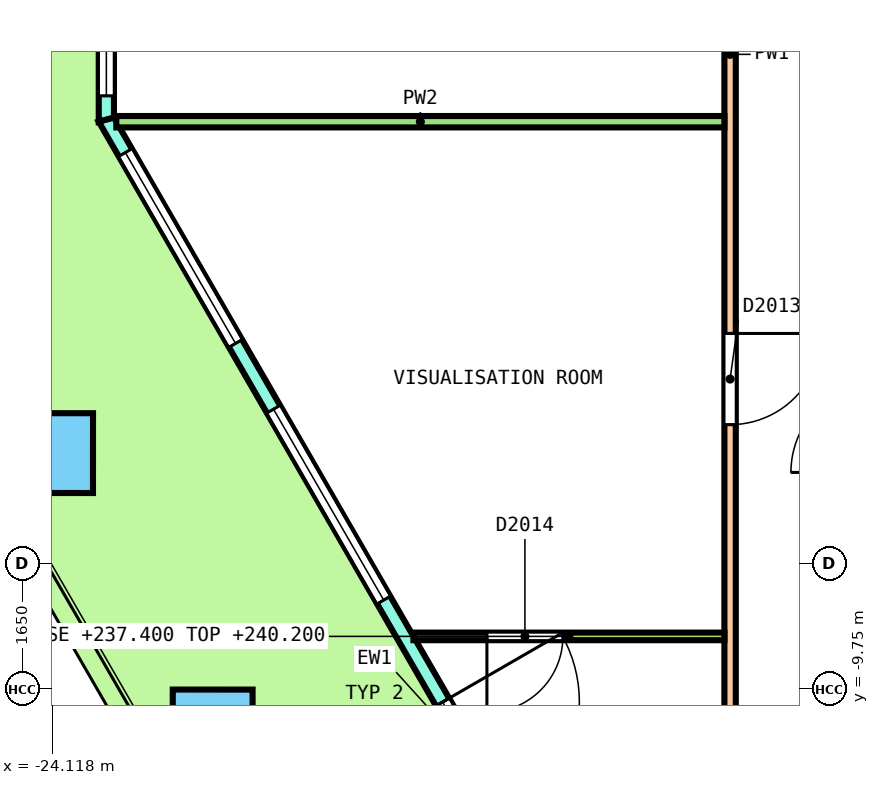
"""IFC4 building model, lengths in metres.
Left out: names, types, materials, properties, quantities, classifications, styles, units other than length and angle.
Written with IfcOpenShell. Run it as: python <this file> out.ifc"""

import sys

from ifc_helpers import new_model, si_unit, direction, frame, frame_2d, origin, origin_2d, place, context, subcontext, project, spatial, polyline, rectangle, outline, extrude, element, fill, save


model = new_model("IFC4")
c1 = context("Model", 3, precision=1e-05, world=origin(), true_north=direction((0.0, 1.0)))
c2 = subcontext(c1, "Body", "Model", "MODEL_VIEW")
j1 = project(units=[si_unit("LENGTHUNIT", "METRE"), si_unit("PLANEANGLEUNIT", "RADIAN")], contexts=[c1])
p1 = place(None, origin())
s1 = spatial("IfcSite", under=j1, at=p1, CompositionType="ELEMENT")
p2 = place(p1, origin())
s2 = spatial("IfcBuilding", under=s1, at=p2, CompositionType="ELEMENT")
p3 = place(p2, frame((0.0, 0.0, 237.4)))
s3 = spatial("IfcBuildingStorey", under=s2, at=p3, CompositionType="ELEMENT", Elevation=237.4)
p4 = place(p3, frame((-24.107, -6.646, 0.0), z_axis=(-0.010899694483, 0.018857140148, 0.999762774325), x_axis=(0.499728940012, -0.865907957958, 0.021780607409)))
e1 = element("IfcColumn", 1, at=p4, inside=s3, PredefinedType="COLUMN", context=c2, shape_type="SweptSolid", body=[
    extrude(rectangle(XDim=1.05, YDim=1.05, at=origin_2d()), origin(), (0.0, 0.0, 1.0), 3.651),
])
p5 = place(p3, frame((-22.008, -10.282, 0.0), z_axis=(-0.003611703602, 0.006287039604, 0.99997371402), x_axis=(0.497890396548, -0.867209652713, 0.007250604559)))
e2 = element("IfcColumn", 2, at=p5, inside=s3, PredefinedType="COLUMN", context=c2, shape_type="SweptSolid", body=[
    extrude(rectangle(XDim=1.05, YDim=1.05, at=origin_2d()), origin(), (0.0, 0.0, 1.0), 3.65),
])
p6 = place(p3, frame((-23.406, 3.894, 0.0), z_axis=(0.0, 0.0, 1.0), x_axis=(0.0, -1.0, 0.0)))
e3 = element("IfcWall", 3, at=p6, inside=s3, PredefinedType="SOLIDWALL", context=c2, shape_type="SweptSolid", body=[
    extrude(outline(polyline([(-0.027, -0.1), (1.008, -0.1), (2.042, -0.1), (3.077, -0.1), (4.111, -0.1), (5.146, -0.1), (6.18, -0.1), (6.126, 0.1), (5.11, 0.1), (4.093, 0.1), (3.077, 0.1), (2.06, 0.1), (1.043, 0.1), (0.027, 0.1), (-0.027, -0.1)])), origin(), (0.0, 0.0, 1.0), 3.7),
])
p7 = place(p6, frame((0.313, 0.0, 0.1)))
e4 = element("IfcOpeningElement", 4, at=p7, cuts=e3, PredefinedType="OPENING", context=c2, shape_type="SweptSolid", body=[
    extrude(rectangle(XDim=2.45, YDim=2.65, at=frame_2d((1.225, 1.325))), frame((0.0, 0.11, 0.0), z_axis=(0.0, -1.0, 0.0), x_axis=(1.0, 0.0, 0.0)), (0.0, 0.0, 1.0), 0.22),
])
p8 = place(p6, frame((3.39, 0.0, 0.1)))
e5 = element("IfcOpeningElement", 5, at=p8, cuts=e3, PredefinedType="OPENING", context=c2, shape_type="SweptSolid", body=[
    extrude(rectangle(XDim=2.45, YDim=2.65, at=frame_2d((1.225, 1.325))), frame((0.0, 0.11, 0.0), z_axis=(0.0, -1.0, 0.0), x_axis=(1.0, 0.0, 0.0)), (0.0, 0.0, 1.0), 0.22),
])
p9 = place(p3, frame((-23.406, -2.26, 0.0), z_axis=(0.0, 0.0, 1.0), x_axis=(0.500001086243, -0.866024776641, 0.0)))
e6 = element("IfcWall", 6, at=p9, inside=s3, PredefinedType="SOLIDWALL", context=c2, shape_type="SweptSolid", body=[
    extrude(outline(polyline([(-0.027, -0.1), (1.002, -0.1), (2.031, -0.1), (3.059, -0.1), (4.088, -0.1), (5.117, -0.1), (6.146, -0.1), (7.175, -0.1), (8.203, -0.1), (9.232, -0.1), (10.261, -0.1), (11.29, -0.1), (12.318, -0.1), (13.347, -0.1), (14.376, -0.1), (15.405, -0.1), (16.433, -0.1), (17.462, -0.1), (18.491, -0.1), (19.52, -0.1), (19.466, 0.1), (18.443, 0.1), (17.42, 0.1), (16.396, 0.1), (15.373, 0.1), (14.35, 0.1), (13.327, 0.1), (12.304, 0.1), (11.281, 0.1), (10.258, 0.1), (9.235, 0.1), (8.212, 0.1), (7.188, 0.1), (6.166, 0.1), (5.142, 0.1), (4.119, 0.1), (3.096, 0.1), (2.073, 0.1), (1.05, 0.1), (0.027, 0.1), (-0.027, -0.1)])), origin(), (0.0, 0.0, 1.0), 3.7),
])
p10 = place(p9, frame((0.499, 0.0, 0.1)))
e7 = element("IfcOpeningElement", 7, at=p10, cuts=e6, PredefinedType="OPENING", context=c2, shape_type="SweptSolid", body=[
    extrude(rectangle(XDim=2.9, YDim=2.65, at=frame_2d((1.45, 1.325))), frame((0.0, 0.11, 0.0), z_axis=(0.0, -1.0, 0.0), x_axis=(1.0, 0.0, 0.0)), (0.0, 0.0, 1.0), 0.22),
])
p11 = place(p9, frame((4.398, 0.0, 0.1)))
e8 = element("IfcOpeningElement", 8, at=p11, cuts=e6, PredefinedType="OPENING", context=c2, shape_type="SweptSolid", body=[
    extrude(rectangle(XDim=2.9, YDim=2.65, at=frame_2d((1.45, 1.325))), frame((0.0, 0.11, 0.0), z_axis=(0.0, -1.0, 0.0), x_axis=(1.0, 0.0, 0.0)), (0.0, 0.0, 1.0), 0.22),
])
p12 = place(p9, frame((8.846, 0.0, 0.0)))
e9 = element("IfcOpeningElement", 9, at=p12, cuts=e6, PredefinedType="OPENING", context=c2, shape_type="SweptSolid", body=[
    extrude(rectangle(XDim=1.8, YDim=2.4, at=frame_2d((0.9, 1.2))), frame((0.0, 0.11, 0.0), z_axis=(0.0, -1.0, 0.0), x_axis=(1.0, 0.0, 0.0)), (0.0, 0.0, 1.0), 0.22),
])
p13 = place(p9, frame((8.846, 0.0, 2.55)))
e10 = element("IfcOpeningElement", 10, at=p13, cuts=e6, PredefinedType="OPENING", context=c2, shape_type="SweptSolid", body=[
    extrude(rectangle(XDim=1.8, YDim=0.2, at=frame_2d((0.9, 0.1))), frame((0.0, 0.11, 0.0), z_axis=(0.0, -1.0, 0.0), x_axis=(1.0, 0.0, 0.0)), (0.0, 0.0, 1.0), 0.22),
])
p14 = place(p9, frame((12.195, 0.0, 0.1)))
e11 = element("IfcOpeningElement", 11, at=p14, cuts=e6, PredefinedType="OPENING", context=c2, shape_type="SweptSolid", body=[
    extrude(rectangle(XDim=2.9, YDim=2.65, at=frame_2d((1.45, 1.325))), frame((0.0, 0.11, 0.0), z_axis=(0.0, -1.0, 0.0), x_axis=(1.0, 0.0, 0.0)), (0.0, 0.0, 1.0), 0.22),
])
p15 = place(p9, frame((16.094, 0.0, 0.1)))
e12 = element("IfcOpeningElement", 12, at=p15, cuts=e6, PredefinedType="OPENING", context=c2, shape_type="SweptSolid", body=[
    extrude(rectangle(XDim=2.9, YDim=2.65, at=frame_2d((1.45, 1.325))), frame((0.0, 0.11, 0.0), z_axis=(0.0, -1.0, 0.0), x_axis=(1.0, 0.0, 0.0)), (0.0, 0.0, 1.0), 0.22),
])
p16 = place(p3, frame((-15.2, -10.025, 0.0), z_axis=(0.0, 0.0, 1.0), x_axis=(0.0, 1.0, 0.0)))
e13 = element("IfcWall", 13, at=p16, inside=s3, PredefinedType="PARTITIONING", context=c2, shape_type="SweptSolid", body=[
    extrude(rectangle(XDim=17.25, YDim=0.15, at=frame_2d((8.625, 0.0))), origin(), (0.0, 0.0, 1.0), 2.8),
])
p17 = place(p16, frame((10.727, 0.0, 0.0)))
e14 = element("IfcOpeningElement", 14, at=p17, cuts=e13, PredefinedType="OPENING", context=c2, shape_type="SweptSolid", body=[
    extrude(rectangle(XDim=1.2, YDim=2.1, at=frame_2d((0.6, 1.05))), frame((0.0, 0.085, 0.0), z_axis=(0.0, -1.0, 0.0), x_axis=(1.0, 0.0, 0.0)), (0.0, 0.0, 1.0), 0.17),
])
p18 = place(p16, frame((3.753, 0.0, 0.0)))
e15 = element("IfcOpeningElement", 15, at=p18, cuts=e13, PredefinedType="OPENING", context=c2, shape_type="SweptSolid", body=[
    extrude(rectangle(XDim=1.2, YDim=2.1, at=frame_2d((0.6, 1.05))), frame((0.0, 0.085, 0.0), z_axis=(0.0, -1.0, 0.0), x_axis=(1.0, 0.0, 0.0)), (0.0, 0.0, 1.0), 0.17),
])
p19 = place(p3, frame((-23.275, -2.286, 0.0), z_axis=(0.0, 0.0, 1.0), x_axis=(1.0, 0.0, 0.0)))
e16 = element("IfcWall", 16, at=p19, inside=s3, PredefinedType="PARTITIONING", context=c2, shape_type="SweptSolid", body=[
    extrude(rectangle(XDim=8.0, YDim=0.15, at=frame_2d((4.0, 0.0))), origin(), (0.0, 0.0, 1.0), 2.8),
])
p20 = place(p3, frame((-19.366, -9.057, 0.0), z_axis=(0.0, 0.0, 1.0), x_axis=(1.0, 0.0, 0.0)))
e17 = element("IfcWall", 17, at=p20, inside=s3, PredefinedType="PARTITIONING", context=c2, shape_type="SweptSolid", body=[
    extrude(rectangle(XDim=4.091, YDim=0.1, at=frame_2d((2.045, 0.0))), origin(), (0.0, 0.0, 1.0), 2.8),
])
p21 = place(p20, frame((0.967, 0.0, 0.0)))
e18 = element("IfcOpeningElement", 18, at=p21, cuts=e17, PredefinedType="OPENING", context=c2, shape_type="SweptSolid", body=[
    extrude(rectangle(XDim=1.0, YDim=2.1, at=frame_2d((0.5, 1.05))), frame((0.0, 0.06, 0.0), z_axis=(0.0, -1.0, 0.0), x_axis=(1.0, 0.0, 0.0)), (0.0, 0.0, 1.0), 0.12),
])
p22 = place(p8, origin())
e19 = element("IfcWindow", 19, at=p22, inside=s3, PartitioningType="SINGLE_PANEL", PredefinedType="WINDOW", context=c2, shape_type="SweptSolid", body=[
    extrude(rectangle(XDim=2.45, YDim=2.65, at=frame_2d((1.225, 1.325))), frame((0.0, 0.03, 0.0), z_axis=(0.0, -1.0, 0.0), x_axis=(1.0, 0.0, 0.0)), (0.0, 0.0, 1.0), 0.06),
])
fill(e5, e19)
p23 = place(p10, origin())
e20 = element("IfcWindow", 20, at=p23, inside=s3, PartitioningType="SINGLE_PANEL", PredefinedType="WINDOW", context=c2, shape_type="SweptSolid", body=[
    extrude(rectangle(XDim=2.9, YDim=2.65, at=frame_2d((1.45, 1.325))), frame((0.0, 0.03, 0.0), z_axis=(0.0, -1.0, 0.0), x_axis=(1.0, 0.0, 0.0)), (0.0, 0.0, 1.0), 0.06),
])
fill(e7, e20)
p24 = place(p11, origin())
e21 = element("IfcWindow", 21, at=p24, inside=s3, PartitioningType="SINGLE_PANEL", PredefinedType="WINDOW", context=c2, shape_type="SweptSolid", body=[
    extrude(rectangle(XDim=2.9, YDim=2.65, at=frame_2d((1.45, 1.325))), frame((0.0, 0.03, 0.0), z_axis=(0.0, -1.0, 0.0), x_axis=(1.0, 0.0, 0.0)), (0.0, 0.0, 1.0), 0.06),
])
fill(e8, e21)
p25 = place(p12, origin())
e22 = element("IfcDoor", 22, at=p25, inside=s3, OperationType="DOUBLE_DOOR_SINGLE_SWING", PredefinedType="DOOR", context=c2, shape_type="SweptSolid", body=[
    extrude(rectangle(XDim=1.8, YDim=2.4, at=frame_2d((0.9, 1.2))), frame((0.0, 0.025, 0.0), z_axis=(0.0, -1.0, 0.0), x_axis=(1.0, 0.0, 0.0)), (0.0, 0.0, 1.0), 0.05),
])
fill(e9, e22)
p26 = place(p13, origin())
e23 = element("IfcWindow", 23, at=p26, inside=s3, PartitioningType="SINGLE_PANEL", PredefinedType="WINDOW", context=c2, shape_type="SweptSolid", body=[
    extrude(rectangle(XDim=1.8, YDim=0.2, at=frame_2d((0.9, 0.1))), frame((0.0, 0.03, 0.0), z_axis=(0.0, -1.0, 0.0), x_axis=(1.0, 0.0, 0.0)), (0.0, 0.0, 1.0), 0.06),
])
fill(e10, e23)
p27 = place(p18, origin())
e24 = element("IfcDoor", 24, at=p27, inside=s3, OperationType="DOUBLE_DOOR_SINGLE_SWING", PredefinedType="DOOR", context=c2, shape_type="SweptSolid", body=[
    extrude(rectangle(XDim=1.2, YDim=2.1, at=frame_2d((0.6, 1.05))), frame((0.0, 0.025, 0.0), z_axis=(0.0, -1.0, 0.0), x_axis=(1.0, 0.0, 0.0)), (0.0, 0.0, 1.0), 0.05),
])
fill(e15, e24)
p28 = place(p21, origin())
e25 = element("IfcDoor", 25, at=p28, inside=s3, OperationType="SINGLE_SWING_LEFT", PredefinedType="DOOR", context=c2, shape_type="SweptSolid", body=[
    extrude(rectangle(XDim=1.0, YDim=2.1, at=frame_2d((0.5, 1.05))), frame((0.0, 0.025, 0.0), z_axis=(0.0, -1.0, 0.0), x_axis=(1.0, 0.0, 0.0)), (0.0, 0.0, 1.0), 0.05),
])
fill(e18, e25)
save(model, sys.argv[1])
